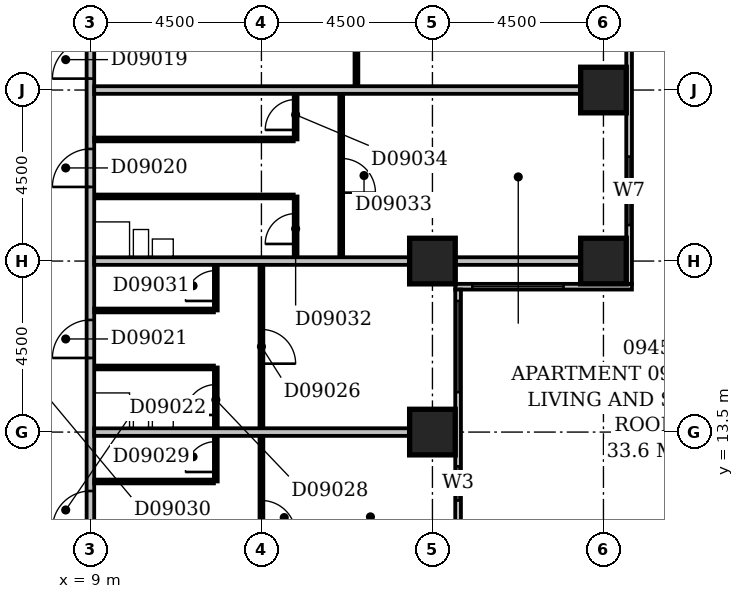
"""IFC4 building model, lengths in metres.
Left out: names, types, materials, properties, quantities, classifications, styles, units other than length and angle.
Written with IfcOpenShell. Run it as: python <this file> out.ifc"""

import sys

from ifc_helpers import new_model, si_unit, direction, frame, frame_2d, origin, origin_2d, place, context, subcontext, project, spatial, rectangle, extrude, element, fill, save


model = new_model("IFC4")
c1 = context("Model", 3, precision=1e-05, world=origin(), true_north=direction((0.0, 1.0)))
c2 = subcontext(c1, "Body", "Model", "MODEL_VIEW")
j1 = project(units=[si_unit("LENGTHUNIT", "METRE"), si_unit("PLANEANGLEUNIT", "RADIAN")], contexts=[c1])
p1 = place(None, origin())
s1 = spatial("IfcSite", under=j1, at=p1, CompositionType="ELEMENT")
p2 = place(p1, origin())
s2 = spatial("IfcBuilding", under=s1, at=p2, CompositionType="ELEMENT")
p3 = place(p2, frame((0.0, 0.0, 43.4)))
s3 = spatial("IfcBuildingStorey", under=s2, at=p3, CompositionType="ELEMENT", Elevation=43.4)
for number, where, z_axis, x_axis in (
    (1, (18.0, 13.5, -0.3), (0.0, 0.0, 1.0), (1.0, 0.0, 0.0)),
    (2, (18.0, 18.0, -0.3), (0.0, 0.0, 1.0), (1.0, 0.0, 0.0)),
    (3, (22.5, 18.0, -0.3), (0.0, 0.0, 1.0), (1.0, 0.0, 0.0)),
    (4, (22.5, 22.5, -0.3), (0.0, 0.0, 1.0), (1.0, 0.0, 0.0)),
):
    element("IfcColumn", number, at=place(p3, frame(where, z_axis=z_axis, x_axis=x_axis)), inside=s3, PredefinedType="COLUMN", context=c2, shape_type="SweptSolid", body=[
        extrude(rectangle(XDim=1.2, YDim=1.2, at=origin_2d()), origin(), (0.0, 0.0, 1.0), 3.6),
    ])
p4 = place(p3, frame((18.675, 8.4, 0.0), z_axis=(0.0, 0.0, 1.0), x_axis=(0.0, 1.0, 0.0)))
e5 = element("IfcWall", 5, at=p4, inside=s3, PredefinedType="STANDARD", context=c2, shape_type="SweptSolid", body=[
    extrude(rectangle(XDim=8.85, YDim=0.15, at=frame_2d((4.425, 0.0))), origin(), (0.0, 0.0, 1.0), 2.7),
])
p5 = place(p4, frame((3.299, 0.0, 0.6)))
e6 = element("IfcOpeningElement", 6, at=p5, cuts=e5, PredefinedType="OPENING", context=c2, shape_type="SweptSolid", body=[
    extrude(rectangle(XDim=0.9, YDim=1.8, at=frame_2d((0.45, 0.9))), frame((0.0, 0.087, 0.0), z_axis=(0.0, -1.0, 0.0), x_axis=(1.0, 0.0, 0.0)), (0.0, 0.0, 1.0), 0.174),
])
p6 = place(p4, frame((6.15, 0.0, 0.6)))
e7 = element("IfcOpeningElement", 7, at=p6, cuts=e5, PredefinedType="OPENING", context=c2, shape_type="SweptSolid", body=[
    extrude(rectangle(XDim=2.4, YDim=1.8, at=frame_2d((1.2, 0.9))), frame((0.0, 0.087, 0.0), z_axis=(0.0, -1.0, 0.0), x_axis=(1.0, 0.0, 0.0)), (0.0, 0.0, 1.0), 0.174),
])
p7 = place(p3, frame((18.6, 17.325, 0.0), z_axis=(0.0, 0.0, 1.0), x_axis=(1.0, 0.0, 0.0)))
e8 = element("IfcWall", 8, at=p7, inside=s3, PredefinedType="STANDARD", context=c2, shape_type="SweptSolid", body=[
    extrude(rectangle(XDim=4.65, YDim=0.15, at=frame_2d((2.325, 0.0))), origin(), (0.0, 0.0, 1.0), 2.7),
])
p8 = place(p7, frame((0.45, 0.0, 0.6)))
e9 = element("IfcOpeningElement", 9, at=p8, cuts=e8, PredefinedType="OPENING", context=c2, shape_type="SweptSolid", body=[
    extrude(rectangle(XDim=2.4, YDim=1.8, at=frame_2d((1.2, 0.9))), frame((0.0, 0.087, 0.0), z_axis=(0.0, -1.0, 0.0), x_axis=(1.0, 0.0, 0.0)), (0.0, 0.0, 1.0), 0.174),
])
p9 = place(p3, frame((23.175, 17.4, 0.0), z_axis=(0.0, 0.0, 1.0), x_axis=(0.0, 1.0, 0.0)))
e10 = element("IfcWall", 10, at=p9, inside=s3, PredefinedType="STANDARD", context=c2, shape_type="SweptSolid", body=[
    extrude(rectangle(XDim=17.85, YDim=0.15, at=frame_2d((8.925, 0.0))), origin(), (0.0, 0.0, 1.0), 2.7),
])
p10 = place(p9, frame((1.548, 0.0, 0.6)))
e11 = element("IfcOpeningElement", 11, at=p10, cuts=e10, PredefinedType="OPENING", context=c2, shape_type="SweptSolid", body=[
    extrude(rectangle(XDim=1.8, YDim=1.8, at=frame_2d((0.9, 0.9))), frame((0.0, 0.087, 0.0), z_axis=(0.0, -1.0, 0.0), x_axis=(1.0, 0.0, 0.0)), (0.0, 0.0, 1.0), 0.174),
])
p11 = place(p9, frame((6.15, 0.0, 0.6)))
e12 = element("IfcOpeningElement", 12, at=p11, cuts=e10, PredefinedType="OPENING", context=c2, shape_type="SweptSolid", body=[
    extrude(rectangle(XDim=2.4, YDim=1.8, at=frame_2d((1.2, 0.9))), frame((0.0, 0.087, 0.0), z_axis=(0.0, -1.0, 0.0), x_axis=(1.0, 0.0, 0.0)), (0.0, 0.0, 1.0), 0.174),
])
p12 = place(p9, frame((10.65, 0.0, 0.6)))
e13 = element("IfcOpeningElement", 13, at=p12, cuts=e10, PredefinedType="OPENING", context=c2, shape_type="SweptSolid", body=[
    extrude(rectangle(XDim=2.4, YDim=1.8, at=frame_2d((1.2, 0.9))), frame((0.0, 0.087, 0.0), z_axis=(0.0, -1.0, 0.0), x_axis=(1.0, 0.0, 0.0)), (0.0, 0.0, 1.0), 0.174),
])
p13 = place(p9, frame((15.15, 0.0, 0.6)))
e14 = element("IfcOpeningElement", 14, at=p13, cuts=e10, PredefinedType="OPENING", context=c2, shape_type="SweptSolid", body=[
    extrude(rectangle(XDim=2.4, YDim=1.8, at=frame_2d((1.2, 0.9))), frame((0.0, 0.087, 0.0), z_axis=(0.0, -1.0, 0.0), x_axis=(1.0, 0.0, 0.0)), (0.0, 0.0, 1.0), 0.174),
])
p14 = place(p3, frame((9.0, 5.0, 0.0), z_axis=(0.0, 0.0, 1.0), x_axis=(0.0, 1.0, 0.0)))
e15 = element("IfcWall", 15, at=p14, inside=s3, PredefinedType="PARTITIONING", context=c2, shape_type="SweptSolid", body=[
    extrude(rectangle(XDim=44.5, YDim=0.2, at=frame_2d((22.25, 0.0))), origin(), (0.0, 0.0, 1.0), 3.3),
])
p15 = place(p14, frame((17.8, 0.0, 0.0)))
e16 = element("IfcOpeningElement", 16, at=p15, cuts=e15, PredefinedType="OPENING", context=c2, shape_type="SweptSolid", body=[
    extrude(rectangle(XDim=1.0, YDim=2.1, at=frame_2d((0.5, 1.05))), frame((0.0, 0.112, 0.0), z_axis=(0.0, -1.0, 0.0), x_axis=(1.0, 0.0, 0.0)), (0.0, 0.0, 1.0), 0.224),
])
p16 = place(p14, frame((14.95, 0.0, 0.0)))
e17 = element("IfcOpeningElement", 17, at=p16, cuts=e15, PredefinedType="OPENING", context=c2, shape_type="SweptSolid", body=[
    extrude(rectangle(XDim=1.0, YDim=2.1, at=frame_2d((0.5, 1.05))), frame((0.0, 0.112, 0.0), z_axis=(0.0, -1.0, 0.0), x_axis=(1.0, 0.0, 0.0)), (0.0, 0.0, 1.0), 0.224),
])
p17 = place(p14, frame((10.45, 0.0, 0.0)))
e18 = element("IfcOpeningElement", 18, at=p17, cuts=e15, PredefinedType="OPENING", context=c2, shape_type="SweptSolid", body=[
    extrude(rectangle(XDim=1.0, YDim=2.1, at=frame_2d((0.5, 1.05))), frame((0.0, 0.112, 0.0), z_axis=(0.0, -1.0, 0.0), x_axis=(1.0, 0.0, 0.0)), (0.0, 0.0, 1.0), 0.224),
])
p18 = place(p14, frame((5.95, 0.0, 0.0)))
e19 = element("IfcOpeningElement", 19, at=p18, cuts=e15, PredefinedType="OPENING", context=c2, shape_type="SweptSolid", body=[
    extrude(rectangle(XDim=1.0, YDim=2.1, at=frame_2d((0.5, 1.05))), frame((0.0, 0.112, 0.0), z_axis=(0.0, -1.0, 0.0), x_axis=(1.0, 0.0, 0.0)), (0.0, 0.0, 1.0), 0.224),
])
p19 = place(p14, frame((32.75, 0.0, 0.0)))
e20 = element("IfcOpeningElement", 20, at=p19, cuts=e15, PredefinedType="OPENING", context=c2, shape_type="SweptSolid", body=[
    extrude(rectangle(XDim=0.9, YDim=2.1, at=frame_2d((0.45, 1.05))), frame((0.0, 0.112, 0.0), z_axis=(0.0, -1.0, 0.0), x_axis=(1.0, 0.0, 0.0)), (0.0, 0.0, 1.0), 0.224),
])
p20 = place(p14, frame((1.5, 0.0, 0.0)))
e21 = element("IfcOpeningElement", 21, at=p20, cuts=e15, PredefinedType="OPENING", context=c2, shape_type="SweptSolid", body=[
    extrude(rectangle(XDim=0.9, YDim=2.1, at=frame_2d((0.45, 1.05))), frame((0.0, 0.112, 0.0), z_axis=(0.0, -1.0, 0.0), x_axis=(1.0, 0.0, 0.0)), (0.0, 0.0, 1.0), 0.224),
])
p21 = place(p3, frame((13.5, 9.6, 0.0), z_axis=(0.0, 0.0, 1.0), x_axis=(0.0, 1.0, 0.0)))
e22 = element("IfcWall", 22, at=p21, inside=s3, PredefinedType="PARTITIONING", context=c2, shape_type="SweptSolid", body=[
    extrude(rectangle(XDim=8.3, YDim=0.1, at=frame_2d((4.15, 0.0))), origin(), (0.0, 0.0, 1.0), 3.3),
])
p22 = place(p21, frame((5.7, 0.0, 0.0)))
e23 = element("IfcOpeningElement", 23, at=p22, cuts=e22, PredefinedType="OPENING", context=c2, shape_type="SweptSolid", body=[
    extrude(rectangle(XDim=0.9, YDim=2.1, at=frame_2d((0.45, 1.05))), frame((0.0, 0.062, 0.0), z_axis=(0.0, -1.0, 0.0), x_axis=(1.0, 0.0, 0.0)), (0.0, 0.0, 1.0), 0.124),
])
p23 = place(p21, frame((1.2, 0.0, 0.0)))
e24 = element("IfcOpeningElement", 24, at=p23, cuts=e22, PredefinedType="OPENING", context=c2, shape_type="SweptSolid", body=[
    extrude(rectangle(XDim=0.9, YDim=2.1, at=frame_2d((0.45, 1.05))), frame((0.0, 0.062, 0.0), z_axis=(0.0, -1.0, 0.0), x_axis=(1.0, 0.0, 0.0)), (0.0, 0.0, 1.0), 0.124),
])
p24 = place(p3, frame((9.1, 12.2, 0.0), z_axis=(0.0, 0.0, 1.0), x_axis=(1.0, 0.0, 0.0)))
e25 = element("IfcWall", 25, at=p24, inside=s3, PredefinedType="PARTITIONING", context=c2, shape_type="SweptSolid", body=[
    extrude(rectangle(XDim=3.15, YDim=0.1, at=frame_2d((1.575, 0.0))), origin(), (0.0, 0.0, 1.0), 3.3),
])
p25 = place(p3, frame((12.3, 12.2, 0.0), z_axis=(0.0, 0.0, 1.0), x_axis=(0.0, 1.0, 0.0)))
e26 = element("IfcWall", 26, at=p25, inside=s3, PredefinedType="PARTITIONING", context=c2, shape_type="SweptSolid", body=[
    extrude(rectangle(XDim=3.0, YDim=0.1, at=frame_2d((1.5, 0.0))), origin(), (0.0, 0.0, 1.0), 3.3),
])
p26 = place(p25, frame((1.75, 0.0, 0.0)))
e27 = element("IfcOpeningElement", 27, at=p26, cuts=e26, PredefinedType="OPENING", context=c2, shape_type="SweptSolid", body=[
    extrude(rectangle(XDim=0.8, YDim=2.1, at=frame_2d((0.4, 1.05))), frame((0.0, 0.062, 0.0), z_axis=(0.0, -1.0, 0.0), x_axis=(1.0, 0.0, 0.0)), (0.0, 0.0, 1.0), 0.124),
])
p27 = place(p25, frame((0.25, 0.0, 0.0)))
e28 = element("IfcOpeningElement", 28, at=p27, cuts=e26, PredefinedType="OPENING", context=c2, shape_type="SweptSolid", body=[
    extrude(rectangle(XDim=0.8, YDim=2.1, at=frame_2d((0.4, 1.05))), frame((0.0, 0.062, 0.0), z_axis=(0.0, -1.0, 0.0), x_axis=(1.0, 0.0, 0.0)), (0.0, 0.0, 1.0), 0.124),
])
p28 = place(p3, frame((9.1, 13.5, 0.0), z_axis=(0.0, 0.0, 1.0), x_axis=(1.0, 0.0, 0.0)))
e29 = element("IfcWall", 29, at=p28, inside=s3, PredefinedType="PARTITIONING", context=c2, shape_type="SweptSolid", body=[
    extrude(rectangle(XDim=8.3, YDim=0.2, at=frame_2d((4.15, 0.0))), origin(), (0.0, 0.0, 1.0), 3.3),
])
p29 = place(p3, frame((9.1, 15.2, 0.0), z_axis=(0.0, 0.0, 1.0), x_axis=(1.0, 0.0, 0.0)))
e30 = element("IfcWall", 30, at=p29, inside=s3, PredefinedType="PLUMBINGWALL", context=c2, shape_type="SweptSolid", body=[
    extrude(rectangle(XDim=3.15, YDim=0.1, at=frame_2d((1.575, 0.0))), origin(), (0.0, 0.0, 1.0), 3.3),
])
p30 = place(p3, frame((9.1, 16.7, 0.0), z_axis=(0.0, 0.0, 1.0), x_axis=(1.0, 0.0, 0.0)))
e31 = element("IfcWall", 31, at=p30, inside=s3, PredefinedType="PARTITIONING", context=c2, shape_type="SweptSolid", body=[
    extrude(rectangle(XDim=3.15, YDim=0.1, at=frame_2d((1.575, 0.0))), origin(), (0.0, 0.0, 1.0), 3.3),
])
p31 = place(p3, frame((12.3, 16.7, 0.0), z_axis=(0.0, 0.0, 1.0), x_axis=(0.0, 1.0, 0.0)))
e32 = element("IfcWall", 32, at=p31, inside=s3, PredefinedType="PARTITIONING", context=c2, shape_type="SweptSolid", body=[
    extrude(rectangle(XDim=1.2, YDim=0.1, at=frame_2d((0.6, 0.0))), origin(), (0.0, 0.0, 1.0), 3.3),
])
p32 = place(p31, frame((0.25, 0.0, 0.0)))
e33 = element("IfcOpeningElement", 33, at=p32, cuts=e32, PredefinedType="OPENING", context=c2, shape_type="SweptSolid", body=[
    extrude(rectangle(XDim=0.8, YDim=2.1, at=frame_2d((0.4, 1.05))), frame((0.0, 0.062, 0.0), z_axis=(0.0, -1.0, 0.0), x_axis=(1.0, 0.0, 0.0)), (0.0, 0.0, 1.0), 0.124),
])
p33 = place(p3, frame((9.1, 18.0, 0.0), z_axis=(0.0, 0.0, 1.0), x_axis=(1.0, 0.0, 0.0)))
e34 = element("IfcWall", 34, at=p33, inside=s3, PredefinedType="PARTITIONING", context=c2, shape_type="SweptSolid", body=[
    extrude(rectangle(XDim=8.3, YDim=0.2, at=frame_2d((4.15, 0.0))), origin(), (0.0, 0.0, 1.0), 2.6),
])
p34 = place(p3, frame((18.6, 18.0, 0.0), z_axis=(0.0, 0.0, 1.0), x_axis=(1.0, 0.0, 0.0)))
e35 = element("IfcWall", 35, at=p34, inside=s3, PredefinedType="PARTITIONING", context=c2, shape_type="SweptSolid", body=[
    extrude(rectangle(XDim=3.3, YDim=0.2, at=frame_2d((1.65, 0.0))), origin(), (0.0, 0.0, 1.0), 2.7),
])
p35 = place(p3, frame((14.4, 18.1, 0.0), z_axis=(0.0, 0.0, 1.0), x_axis=(0.0, 1.0, 0.0)))
e36 = element("IfcWall", 36, at=p35, inside=s3, PredefinedType="PARTITIONING", context=c2, shape_type="SweptSolid", body=[
    extrude(rectangle(XDim=1.6, YDim=0.1, at=frame_2d((0.8, 0.0))), origin(), (0.0, 0.0, 1.0), 3.3),
])
p36 = place(p35, frame((0.35, 0.0, 0.0)))
e37 = element("IfcOpeningElement", 37, at=p36, cuts=e36, PredefinedType="OPENING", context=c2, shape_type="SweptSolid", body=[
    extrude(rectangle(XDim=0.8, YDim=2.1, at=frame_2d((0.4, 1.05))), frame((0.0, 0.062, 0.0), z_axis=(0.0, -1.0, 0.0), x_axis=(1.0, 0.0, 0.0)), (0.0, 0.0, 1.0), 0.124),
])
p37 = place(p3, frame((15.6, 18.1, 0.0), z_axis=(0.0, 0.0, 1.0), x_axis=(0.0, 1.0, 0.0)))
e38 = element("IfcWall", 38, at=p37, inside=s3, PredefinedType="PARTITIONING", context=c2, shape_type="SweptSolid", body=[
    extrude(rectangle(XDim=4.3, YDim=0.1, at=frame_2d((2.15, 0.0))), origin(), (0.0, 0.0, 1.0), 3.3),
])
p38 = place(p37, frame((1.7, 0.0, 0.0)))
e39 = element("IfcOpeningElement", 39, at=p38, cuts=e38, PredefinedType="OPENING", context=c2, shape_type="SweptSolid", body=[
    extrude(rectangle(XDim=0.9, YDim=2.1, at=frame_2d((0.45, 1.05))), frame((0.0, 0.062, 0.0), z_axis=(0.0, -1.0, 0.0), x_axis=(1.0, 0.0, 0.0)), (0.0, 0.0, 1.0), 0.124),
])
p39 = place(p3, frame((9.1, 19.7, 0.0), z_axis=(0.0, 0.0, 1.0), x_axis=(1.0, 0.0, 0.0)))
e40 = element("IfcWall", 40, at=p39, inside=s3, PredefinedType="PLUMBINGWALL", context=c2, shape_type="SweptSolid", body=[
    extrude(rectangle(XDim=5.25, YDim=0.1, at=frame_2d((2.625, 0.0))), origin(), (0.0, 0.0, 1.0), 3.3),
])
p40 = place(p3, frame((9.1, 21.2, 0.0), z_axis=(0.0, 0.0, 1.0), x_axis=(1.0, 0.0, 0.0)))
e41 = element("IfcWall", 41, at=p40, inside=s3, PredefinedType="PARTITIONING", context=c2, shape_type="SweptSolid", body=[
    extrude(rectangle(XDim=5.25, YDim=0.1, at=frame_2d((2.625, 0.0))), origin(), (0.0, 0.0, 1.0), 3.3),
])
p41 = place(p3, frame((14.4, 21.2, 0.0), z_axis=(0.0, 0.0, 1.0), x_axis=(0.0, 1.0, 0.0)))
e42 = element("IfcWall", 42, at=p41, inside=s3, PredefinedType="PARTITIONING", context=c2, shape_type="SweptSolid", body=[
    extrude(rectangle(XDim=1.2, YDim=0.1, at=frame_2d((0.6, 0.0))), origin(), (0.0, 0.0, 1.0), 3.3),
])
p42 = place(p41, frame((0.25, 0.0, 0.0)))
e43 = element("IfcOpeningElement", 43, at=p42, cuts=e42, PredefinedType="OPENING", context=c2, shape_type="SweptSolid", body=[
    extrude(rectangle(XDim=0.8, YDim=2.1, at=frame_2d((0.4, 1.05))), frame((0.0, 0.062, 0.0), z_axis=(0.0, -1.0, 0.0), x_axis=(1.0, 0.0, 0.0)), (0.0, 0.0, 1.0), 0.124),
])
p43 = place(p3, frame((9.1, 22.5, 0.0), z_axis=(0.0, 0.0, 1.0), x_axis=(1.0, 0.0, 0.0)))
e44 = element("IfcWall", 44, at=p43, inside=s3, PredefinedType="PARTITIONING", context=c2, shape_type="SweptSolid", body=[
    extrude(rectangle(XDim=12.8, YDim=0.2, at=frame_2d((6.4, 0.0))), origin(), (0.0, 0.0, 1.0), 3.3),
])
p44 = place(p3, frame((16.0, 22.6, 0.0), z_axis=(0.0, 0.0, 1.0), x_axis=(0.0, 1.0, 0.0)))
e45 = element("IfcWall", 45, at=p44, inside=s3, PredefinedType="PARTITIONING", context=c2, shape_type="SweptSolid", body=[
    extrude(rectangle(XDim=13.3, YDim=0.1, at=frame_2d((6.65, 0.0))), origin(), (0.0, 0.0, 1.0), 3.3),
])
p45 = place(p44, frame((3.9, 0.0, 0.0)))
e46 = element("IfcOpeningElement", 46, at=p45, cuts=e45, PredefinedType="OPENING", context=c2, shape_type="SweptSolid", body=[
    extrude(rectangle(XDim=0.9, YDim=2.1, at=frame_2d((0.45, 1.05))), frame((0.0, 0.062, 0.0), z_axis=(0.0, -1.0, 0.0), x_axis=(1.0, 0.0, 0.0)), (0.0, 0.0, 1.0), 0.124),
])
p46 = place(p44, frame((10.7, 0.0, 0.0)))
e47 = element("IfcOpeningElement", 47, at=p46, cuts=e45, PredefinedType="OPENING", context=c2, shape_type="SweptSolid", body=[
    extrude(rectangle(XDim=0.9, YDim=2.1, at=frame_2d((0.45, 1.05))), frame((0.0, 0.062, 0.0), z_axis=(0.0, -1.0, 0.0), x_axis=(1.0, 0.0, 0.0)), (0.0, 0.0, 1.0), 0.124),
])
p47 = place(p5, origin())
e48 = element("IfcWindow", 48, at=p47, inside=s3, PartitioningType="SINGLE_PANEL", PredefinedType="WINDOW", context=c2, shape_type="SweptSolid", body=[
    extrude(rectangle(XDim=0.9, YDim=1.8, at=frame_2d((0.45, 0.9))), frame((0.0, 0.03, 0.0), z_axis=(0.0, -1.0, 0.0), x_axis=(1.0, 0.0, 0.0)), (0.0, 0.0, 1.0), 0.06),
])
fill(e6, e48)
p48 = place(p6, origin())
e49 = element("IfcWindow", 49, at=p48, inside=s3, PartitioningType="SINGLE_PANEL", PredefinedType="WINDOW", context=c2, shape_type="SweptSolid", body=[
    extrude(rectangle(XDim=2.4, YDim=1.8, at=frame_2d((1.2, 0.9))), frame((0.0, 0.03, 0.0), z_axis=(0.0, -1.0, 0.0), x_axis=(1.0, 0.0, 0.0)), (0.0, 0.0, 1.0), 0.06),
])
fill(e7, e49)
p49 = place(p8, origin())
e50 = element("IfcWindow", 50, at=p49, inside=s3, PartitioningType="SINGLE_PANEL", PredefinedType="WINDOW", context=c2, shape_type="SweptSolid", body=[
    extrude(rectangle(XDim=2.4, YDim=1.8, at=frame_2d((1.2, 0.9))), frame((0.0, 0.03, 0.0), z_axis=(0.0, -1.0, 0.0), x_axis=(1.0, 0.0, 0.0)), (0.0, 0.0, 1.0), 0.06),
])
fill(e9, e50)
p50 = place(p10, origin())
e51 = element("IfcWindow", 51, at=p50, inside=s3, PartitioningType="SINGLE_PANEL", PredefinedType="WINDOW", context=c2, shape_type="SweptSolid", body=[
    extrude(rectangle(XDim=1.8, YDim=1.8, at=frame_2d((0.9, 0.9))), frame((0.0, 0.03, 0.0), z_axis=(0.0, -1.0, 0.0), x_axis=(1.0, 0.0, 0.0)), (0.0, 0.0, 1.0), 0.06),
])
fill(e11, e51)
p51 = place(p15, origin())
e52 = element("IfcDoor", 52, at=p51, inside=s3, OperationType="SINGLE_SWING_LEFT", PredefinedType="DOOR", context=c2, shape_type="SweptSolid", body=[
    extrude(rectangle(XDim=1.0, YDim=2.1, at=frame_2d((0.5, 1.05))), frame((0.0, 0.025, 0.0), z_axis=(0.0, -1.0, 0.0), x_axis=(1.0, 0.0, 0.0)), (0.0, 0.0, 1.0), 0.05),
])
fill(e16, e52)
p52 = place(p16, origin())
e53 = element("IfcDoor", 53, at=p52, inside=s3, OperationType="SINGLE_SWING_LEFT", PredefinedType="DOOR", context=c2, shape_type="SweptSolid", body=[
    extrude(rectangle(XDim=1.0, YDim=2.1, at=frame_2d((0.5, 1.05))), frame((0.0, 0.025, 0.0), z_axis=(0.0, -1.0, 0.0), x_axis=(1.0, 0.0, 0.0)), (0.0, 0.0, 1.0), 0.05),
])
fill(e17, e53)
p53 = place(p17, origin())
e54 = element("IfcDoor", 54, at=p53, inside=s3, OperationType="SINGLE_SWING_LEFT", PredefinedType="DOOR", context=c2, shape_type="SweptSolid", body=[
    extrude(rectangle(XDim=1.0, YDim=2.1, at=frame_2d((0.5, 1.05))), frame((0.0, 0.025, 0.0), z_axis=(0.0, -1.0, 0.0), x_axis=(1.0, 0.0, 0.0)), (0.0, 0.0, 1.0), 0.05),
])
fill(e18, e54)
p54 = place(p18, origin())
e55 = element("IfcDoor", 55, at=p54, inside=s3, OperationType="SINGLE_SWING_LEFT", PredefinedType="DOOR", context=c2, shape_type="SweptSolid", body=[
    extrude(rectangle(XDim=1.0, YDim=2.1, at=frame_2d((0.5, 1.05))), frame((0.0, 0.025, 0.0), z_axis=(0.0, -1.0, 0.0), x_axis=(1.0, 0.0, 0.0)), (0.0, 0.0, 1.0), 0.05),
])
fill(e19, e55)
p55 = place(p22, frame((0.9, 0.0, 0.0), z_axis=(0.0, 0.0, 1.0), x_axis=(-1.0, 0.0, 0.0)))
e56 = element("IfcDoor", 56, at=p55, inside=s3, OperationType="SINGLE_SWING_RIGHT", PredefinedType="DOOR", context=c2, shape_type="SweptSolid", body=[
    extrude(rectangle(XDim=0.9, YDim=2.1, at=frame_2d((0.45, 1.05))), frame((0.0, 0.025, 0.0), z_axis=(0.0, -1.0, 0.0), x_axis=(1.0, 0.0, 0.0)), (0.0, 0.0, 1.0), 0.05),
])
fill(e23, e56)
p56 = place(p23, frame((0.9, 0.0, 0.0), z_axis=(0.0, 0.0, 1.0), x_axis=(-1.0, 0.0, 0.0)))
e57 = element("IfcDoor", 57, at=p56, inside=s3, OperationType="SINGLE_SWING_RIGHT", PredefinedType="DOOR", context=c2, shape_type="SweptSolid", body=[
    extrude(rectangle(XDim=0.9, YDim=2.1, at=frame_2d((0.45, 1.05))), frame((0.0, 0.025, 0.0), z_axis=(0.0, -1.0, 0.0), x_axis=(1.0, 0.0, 0.0)), (0.0, 0.0, 1.0), 0.05),
])
fill(e24, e57)
p57 = place(p26, origin())
e58 = element("IfcDoor", 58, at=p57, inside=s3, OperationType="SINGLE_SWING_LEFT", PredefinedType="DOOR", context=c2, shape_type="SweptSolid", body=[
    extrude(rectangle(XDim=0.8, YDim=2.1, at=frame_2d((0.4, 1.05))), frame((0.0, 0.025, 0.0), z_axis=(0.0, -1.0, 0.0), x_axis=(1.0, 0.0, 0.0)), (0.0, 0.0, 1.0), 0.05),
])
fill(e27, e58)
p58 = place(p27, origin())
e59 = element("IfcDoor", 59, at=p58, inside=s3, OperationType="SINGLE_SWING_LEFT", PredefinedType="DOOR", context=c2, shape_type="SweptSolid", body=[
    extrude(rectangle(XDim=0.8, YDim=2.1, at=frame_2d((0.4, 1.05))), frame((0.0, 0.025, 0.0), z_axis=(0.0, -1.0, 0.0), x_axis=(1.0, 0.0, 0.0)), (0.0, 0.0, 1.0), 0.05),
])
fill(e28, e59)
p59 = place(p32, origin())
e60 = element("IfcDoor", 60, at=p59, inside=s3, OperationType="SINGLE_SWING_LEFT", PredefinedType="DOOR", context=c2, shape_type="SweptSolid", body=[
    extrude(rectangle(XDim=0.8, YDim=2.1, at=frame_2d((0.4, 1.05))), frame((0.0, 0.025, 0.0), z_axis=(0.0, -1.0, 0.0), x_axis=(1.0, 0.0, 0.0)), (0.0, 0.0, 1.0), 0.05),
])
fill(e33, e60)
p60 = place(p36, origin())
e61 = element("IfcDoor", 61, at=p60, inside=s3, OperationType="SINGLE_SWING_LEFT", PredefinedType="DOOR", context=c2, shape_type="SweptSolid", body=[
    extrude(rectangle(XDim=0.8, YDim=2.1, at=frame_2d((0.4, 1.05))), frame((0.0, 0.025, 0.0), z_axis=(0.0, -1.0, 0.0), x_axis=(1.0, 0.0, 0.0)), (0.0, 0.0, 1.0), 0.05),
])
fill(e37, e61)
p61 = place(p38, frame((0.9, 0.0, 0.0), z_axis=(0.0, 0.0, 1.0), x_axis=(-1.0, 0.0, 0.0)))
e62 = element("IfcDoor", 62, at=p61, inside=s3, OperationType="SINGLE_SWING_RIGHT", PredefinedType="DOOR", context=c2, shape_type="SweptSolid", body=[
    extrude(rectangle(XDim=0.9, YDim=2.1, at=frame_2d((0.45, 1.05))), frame((0.0, 0.025, 0.0), z_axis=(0.0, -1.0, 0.0), x_axis=(1.0, 0.0, 0.0)), (0.0, 0.0, 1.0), 0.05),
])
fill(e39, e62)
p62 = place(p42, origin())
e63 = element("IfcDoor", 63, at=p62, inside=s3, OperationType="SINGLE_SWING_LEFT", PredefinedType="DOOR", context=c2, shape_type="SweptSolid", body=[
    extrude(rectangle(XDim=0.8, YDim=2.1, at=frame_2d((0.4, 1.05))), frame((0.0, 0.025, 0.0), z_axis=(0.0, -1.0, 0.0), x_axis=(1.0, 0.0, 0.0)), (0.0, 0.0, 1.0), 0.05),
])
fill(e43, e63)
save(model, sys.argv[1])
